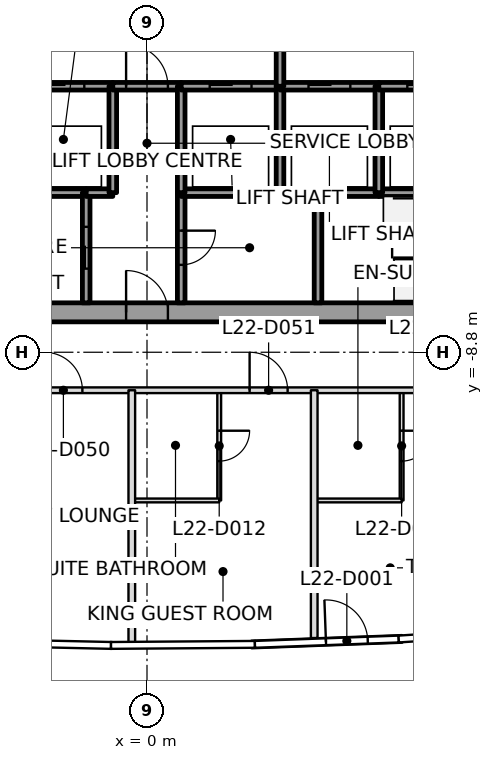
"""IFC4 building model, lengths in metres.
Left out: names, types, materials, properties, quantities, classifications, styles, units other than length and angle.
Written with IfcOpenShell. Run it as: python <this file> out.ifc"""

import sys

from ifc_helpers import new_model, si_unit, direction, frame, frame_2d, origin, place, context, subcontext, project, spatial, rectangle, extrude, element, fill, save


model = new_model("IFC4")
c1 = context("Model", 3, precision=1e-05, world=origin(), true_north=direction((0.0, 1.0)))
c2 = subcontext(c1, "Body", "Model", "MODEL_VIEW")
j1 = project(units=[si_unit("LENGTHUNIT", "METRE"), si_unit("PLANEANGLEUNIT", "RADIAN")], contexts=[c1])
p1 = place(None, origin())
s1 = spatial("IfcSite", under=j1, at=p1, CompositionType="ELEMENT")
p2 = place(p1, origin())
s2 = spatial("IfcBuilding", under=s1, at=p2, CompositionType="ELEMENT")
p3 = place(p2, frame((0.0, 0.0, 103.5)))
s3 = spatial("IfcBuildingStorey", under=s2, at=p3, CompositionType="ELEMENT", Elevation=103.5)
p4 = place(p3, frame((-11.0, -7.75, 0.0), z_axis=(0.0, 0.0, 1.0), x_axis=(1.0, 0.0, 0.0)))
e1 = element("IfcWall", 1, at=p4, inside=s3, PredefinedType="SHEAR", context=c2, shape_type="SweptSolid", body=[
    extrude(rectangle(XDim=22.0, YDim=0.5, at=frame_2d((11.0, 0.0))), origin(), (0.0, 0.0, 1.0), 3.7),
])
p5 = place(p4, frame((10.45, 0.0, 0.0)))
e2 = element("IfcOpeningElement", 2, at=p5, cuts=e1, PredefinedType="OPENING", context=c2, shape_type="SweptSolid", body=[
    extrude(rectangle(XDim=1.1, YDim=2.1, at=frame_2d((0.55, 1.05))), frame((0.0, 0.25, 0.0), z_axis=(0.0, -1.0, 0.0), x_axis=(1.0, 0.0, 0.0)), (0.0, 0.0, 1.0), 0.5),
])
p6 = place(p3, frame((2.75, -16.49, 0.0), z_axis=(0.0, 0.0, 1.0), x_axis=(0.999313230766, 0.037054916226, 0.0)))
e3 = element("IfcWall", 3, at=p6, inside=s3, PredefinedType="SOLIDWALL", context=c2, shape_type="SweptSolid", body=[
    extrude(rectangle(XDim=3.966, YDim=0.2, at=frame_2d((1.983, 0.0))), origin(), (0.0, 0.0, 1.0), 3.017),
])
p7 = place(p6, frame((1.96, 0.0, 0.0)))
e4 = element("IfcOpeningElement", 4, at=p7, cuts=e3, PredefinedType="OPENING", context=c2, shape_type="SweptSolid", body=[
    extrude(rectangle(XDim=1.1, YDim=2.1, at=frame_2d((0.55, 1.05))), frame((0.0, 0.1, 0.0), z_axis=(0.0, -1.0, 0.0), x_axis=(1.0, 0.0, 0.0)), (0.0, 0.0, 1.0), 0.2),
])
p8 = place(p3, frame((-3.5, -4.6, 0.0), z_axis=(0.0, 0.0, 1.0), x_axis=(1.0, 0.0, 0.0)))
e5 = element("IfcWall", 5, at=p8, inside=s3, PredefinedType="SOLIDWALL", context=c2, shape_type="SweptSolid", body=[
    extrude(rectangle(XDim=1.9, YDim=0.2, at=frame_2d((0.95, 0.0))), origin(), (0.0, 0.0, 1.0), 3.55),
])
p9 = place(p3, frame((-3.5, -1.8, 0.0), z_axis=(0.0, 0.0, 1.0), x_axis=(1.0, 0.0, 0.0)))
e6 = element("IfcWall", 6, at=p9, inside=s3, PredefinedType="SOLIDWALL", context=c2, shape_type="SweptSolid", body=[
    extrude(rectangle(XDim=2.6, YDim=0.2, at=frame_2d((1.3, 0.0))), origin(), (0.0, 0.0, 1.0), 3.55),
])
p10 = place(p9, frame((0.75, 0.0, 0.0)))
e7 = element("IfcOpeningElement", 7, at=p10, cuts=e6, PredefinedType="OPENING", context=c2, shape_type="SweptSolid", body=[
    extrude(rectangle(XDim=1.1, YDim=2.1, at=frame_2d((0.55, 1.05))), frame((0.0, 0.1, 0.0), z_axis=(0.0, -1.0, 0.0), x_axis=(1.0, 0.0, 0.0)), (0.0, 0.0, 1.0), 0.2),
])
p11 = place(p3, frame((-1.6, -7.5, 0.0), z_axis=(0.0, 0.0, 1.0), x_axis=(0.0, 1.0, 0.0)))
e8 = element("IfcWall", 8, at=p11, inside=s3, PredefinedType="SOLIDWALL", context=c2, shape_type="SweptSolid", body=[
    extrude(rectangle(XDim=2.9, YDim=0.2, at=frame_2d((1.45, 0.0))), origin(), (0.0, 0.0, 1.0), 3.55),
])
p12 = place(p11, frame((0.9, 0.0, 0.0)))
e9 = element("IfcOpeningElement", 9, at=p12, cuts=e8, PredefinedType="OPENING", context=c2, shape_type="SweptSolid", body=[
    extrude(rectangle(XDim=1.1, YDim=2.1, at=frame_2d((0.55, 1.05))), frame((0.0, 0.1, 0.0), z_axis=(0.0, -1.0, 0.0), x_axis=(1.0, 0.0, 0.0)), (0.0, 0.0, 1.0), 0.2),
])
p13 = place(p3, frame((-1.6, -4.6, 0.0), z_axis=(0.0, 0.0, 1.0), x_axis=(1.0, 0.0, 0.0)))
e10 = element("IfcWall", 10, at=p13, inside=s3, PredefinedType="SOLIDWALL", context=c2, shape_type="SweptSolid", body=[
    extrude(rectangle(XDim=0.7, YDim=0.2, at=frame_2d((0.35, 0.0))), origin(), (0.0, 0.0, 1.0), 3.55),
])
p14 = place(p3, frame((-0.9, -4.6, 0.0), z_axis=(0.0, 0.0, 1.0), x_axis=(0.0, 1.0, 0.0)))
e11 = element("IfcWall", 11, at=p14, inside=s3, PredefinedType="SOLIDWALL", context=c2, shape_type="SweptSolid", body=[
    extrude(rectangle(XDim=2.8, YDim=0.2, at=frame_2d((1.4, 0.0))), origin(), (0.0, 0.0, 1.0), 3.55),
])
p15 = place(p3, frame((-0.9, -1.8, 0.0), z_axis=(0.0, 0.0, 1.0), x_axis=(1.0, 0.0, 0.0)))
e12 = element("IfcWall", 12, at=p15, inside=s3, PredefinedType="SOLIDWALL", context=c2, shape_type="SweptSolid", body=[
    extrude(rectangle(XDim=1.8, YDim=0.2, at=frame_2d((0.9, 0.0))), origin(), (0.0, 0.0, 1.0), 3.55),
])
p16 = place(p15, frame((0.35, 0.0, 0.0)))
e13 = element("IfcOpeningElement", 13, at=p16, cuts=e12, PredefinedType="OPENING", context=c2, shape_type="SweptSolid", body=[
    extrude(rectangle(XDim=1.1, YDim=2.1, at=frame_2d((0.55, 1.05))), frame((0.0, 0.1, 0.0), z_axis=(0.0, -1.0, 0.0), x_axis=(1.0, 0.0, 0.0)), (0.0, 0.0, 1.0), 0.2),
])
p17 = place(p3, frame((0.9, -4.6, 0.0), z_axis=(0.0, 0.0, 1.0), x_axis=(0.0, -1.0, 0.0)))
e14 = element("IfcWall", 14, at=p17, inside=s3, PredefinedType="SOLIDWALL", context=c2, shape_type="SweptSolid", body=[
    extrude(rectangle(XDim=2.9, YDim=0.2, at=frame_2d((1.45, 0.0))), origin(), (0.0, 0.0, 1.0), 3.55),
])
p18 = place(p17, frame((1.0, 0.0, 0.0)))
e15 = element("IfcOpeningElement", 15, at=p18, cuts=e14, PredefinedType="OPENING", context=c2, shape_type="SweptSolid", body=[
    extrude(rectangle(XDim=0.9, YDim=2.1, at=frame_2d((0.45, 1.05))), frame((0.0, 0.1, 0.0), z_axis=(0.0, -1.0, 0.0), x_axis=(1.0, 0.0, 0.0)), (0.0, 0.0, 1.0), 0.2),
])
p19 = place(p3, frame((3.5, -4.6, 0.0), z_axis=(0.0, 0.0, 1.0), x_axis=(-1.0, 0.0, 0.0)))
e16 = element("IfcWall", 16, at=p19, inside=s3, PredefinedType="SOLIDWALL", context=c2, shape_type="SweptSolid", body=[
    extrude(rectangle(XDim=2.6, YDim=0.2, at=frame_2d((1.3, 0.0))), origin(), (0.0, 0.0, 1.0), 3.55),
])
p20 = place(p3, frame((0.9, -1.8, 0.0), z_axis=(0.0, 0.0, 1.0), x_axis=(0.0, -1.0, 0.0)))
e17 = element("IfcWall", 17, at=p20, inside=s3, PredefinedType="SOLIDWALL", context=c2, shape_type="SweptSolid", body=[
    extrude(rectangle(XDim=2.8, YDim=0.2, at=frame_2d((1.4, 0.0))), origin(), (0.0, 0.0, 1.0), 3.55),
])
p21 = place(p3, frame((0.9, -1.8, 0.0), z_axis=(0.0, 0.0, 1.0), x_axis=(1.0, 0.0, 0.0)))
e18 = element("IfcWall", 18, at=p21, inside=s3, PredefinedType="SOLIDWALL", context=c2, shape_type="SweptSolid", body=[
    extrude(rectangle(XDim=2.6, YDim=0.2, at=frame_2d((1.3, 0.0))), origin(), (0.0, 0.0, 1.0), 3.55),
])
p22 = place(p21, frame((0.75, 0.0, 0.0)))
e19 = element("IfcOpeningElement", 19, at=p22, cuts=e18, PredefinedType="OPENING", context=c2, shape_type="SweptSolid", body=[
    extrude(rectangle(XDim=1.1, YDim=2.1, at=frame_2d((0.55, 1.05))), frame((0.0, 0.1, 0.0), z_axis=(0.0, -1.0, 0.0), x_axis=(1.0, 0.0, 0.0)), (0.0, 0.0, 1.0), 0.2),
])
p23 = place(p3, frame((4.5, -4.6, 0.0), z_axis=(0.0, 0.0, 1.0), x_axis=(-1.0, 0.0, 0.0)))
e20 = element("IfcWall", 20, at=p23, inside=s3, PredefinedType="SOLIDWALL", context=c2, shape_type="SweptSolid", body=[
    extrude(rectangle(XDim=1.0, YDim=0.2, at=frame_2d((0.5, 0.0))), origin(), (0.0, 0.0, 1.0), 3.55),
])
p24 = place(p3, frame((3.5, -4.6, 0.0), z_axis=(0.0, 0.0, 1.0), x_axis=(0.0, 1.0, 0.0)))
e21 = element("IfcWall", 21, at=p24, inside=s3, PredefinedType="SOLIDWALL", context=c2, shape_type="SweptSolid", body=[
    extrude(rectangle(XDim=2.8, YDim=0.2, at=frame_2d((1.4, 0.0))), origin(), (0.0, 0.0, 1.0), 3.55),
])
p25 = place(p3, frame((3.5, -1.8, 0.0), z_axis=(0.0, 0.0, 1.0), x_axis=(1.0, 0.0, 0.0)))
e22 = element("IfcWall", 22, at=p25, inside=s3, PredefinedType="SOLIDWALL", context=c2, shape_type="SweptSolid", body=[
    extrude(rectangle(XDim=2.6, YDim=0.2, at=frame_2d((1.3, 0.0))), origin(), (0.0, 0.0, 1.0), 3.55),
])
p26 = place(p25, frame((0.75, 0.0, 0.0)))
e23 = element("IfcOpeningElement", 23, at=p26, cuts=e22, PredefinedType="OPENING", context=c2, shape_type="SweptSolid", body=[
    extrude(rectangle(XDim=1.1, YDim=2.1, at=frame_2d((0.55, 1.05))), frame((0.0, 0.1, 0.0), z_axis=(0.0, -1.0, 0.0), x_axis=(1.0, 0.0, 0.0)), (0.0, 0.0, 1.0), 0.2),
])
p27 = place(p3, frame((3.5, -1.8, 0.0), z_axis=(0.0, 0.0, 1.0), x_axis=(0.0, 1.0, 0.0)))
e24 = element("IfcWall", 24, at=p27, inside=s3, PredefinedType="SOLIDWALL", context=c2, shape_type="SweptSolid", body=[
    extrude(rectangle(XDim=3.6, YDim=0.2, at=frame_2d((1.8, 0.0))), origin(), (0.0, 0.0, 1.0), 3.55),
])
p28 = place(p27, frame((1.05, 0.0, 0.0)))
e25 = element("IfcOpeningElement", 25, at=p28, cuts=e24, PredefinedType="OPENING", context=c2, shape_type="SweptSolid", body=[
    extrude(rectangle(XDim=1.5, YDim=2.1, at=frame_2d((0.75, 1.05))), frame((0.0, 0.1, 0.0), z_axis=(0.0, -1.0, 0.0), x_axis=(1.0, 0.0, 0.0)), (0.0, 0.0, 1.0), 0.2),
])
p29 = place(p3, frame((4.5, -7.5, 0.0), z_axis=(0.0, 0.0, 1.0), x_axis=(0.0, 1.0, 0.0)))
e26 = element("IfcWall", 26, at=p29, inside=s3, PredefinedType="SOLIDWALL", context=c2, shape_type="SweptSolid", body=[
    extrude(rectangle(XDim=2.9, YDim=0.2, at=frame_2d((1.45, 0.0))), origin(), (0.0, 0.0, 1.0), 3.55),
])
p30 = place(p3, frame((4.5, -4.6, 0.0), z_axis=(0.0, 0.0, 1.0), x_axis=(1.0, 0.0, 0.0)))
e27 = element("IfcWall", 27, at=p30, inside=s3, PredefinedType="SOLIDWALL", context=c2, shape_type="SweptSolid", body=[
    extrude(rectangle(XDim=1.6, YDim=0.2, at=frame_2d((0.8, 0.0))), origin(), (0.0, 0.0, 1.0), 3.55),
])
p31 = place(p3, frame((6.1, -4.6, 0.0), z_axis=(0.0, 0.0, 1.0), x_axis=(1.0, 0.0, 0.0)))
e28 = element("IfcWall", 28, at=p31, inside=s3, PredefinedType="SOLIDWALL", context=c2, shape_type="SweptSolid", body=[
    extrude(rectangle(XDim=2.6, YDim=0.2, at=frame_2d((1.3, 0.0))), origin(), (0.0, 0.0, 1.0), 3.55),
])
p32 = place(p3, frame((6.1, -4.6, 0.0), z_axis=(0.0, 0.0, 1.0), x_axis=(0.0, 1.0, 0.0)))
e29 = element("IfcWall", 29, at=p32, inside=s3, PredefinedType="SOLIDWALL", context=c2, shape_type="SweptSolid", body=[
    extrude(rectangle(XDim=2.8, YDim=0.2, at=frame_2d((1.4, 0.0))), origin(), (0.0, 0.0, 1.0), 3.55),
])
p33 = place(p3, frame((6.1, -1.8, 0.0), z_axis=(0.0, 0.0, 1.0), x_axis=(1.0, 0.0, 0.0)))
e30 = element("IfcWall", 30, at=p33, inside=s3, PredefinedType="SOLIDWALL", context=c2, shape_type="SweptSolid", body=[
    extrude(rectangle(XDim=2.6, YDim=0.2, at=frame_2d((1.3, 0.0))), origin(), (0.0, 0.0, 1.0), 3.55),
])
p34 = place(p33, frame((0.75, 0.0, 0.0)))
e31 = element("IfcOpeningElement", 31, at=p34, cuts=e30, PredefinedType="OPENING", context=c2, shape_type="SweptSolid", body=[
    extrude(rectangle(XDim=1.1, YDim=2.1, at=frame_2d((0.55, 1.05))), frame((0.0, 0.1, 0.0), z_axis=(0.0, -1.0, 0.0), x_axis=(1.0, 0.0, 0.0)), (0.0, 0.0, 1.0), 0.2),
])
p35 = place(p3, frame((-0.4, -16.515, 0.0), z_axis=(0.0, 0.0, 1.0), x_axis=(0.0, 1.0, 0.0)))
e32 = element("IfcWall", 32, at=p35, inside=s3, PredefinedType="PARTITIONING", context=c2, shape_type="SweptSolid", body=[
    extrude(rectangle(XDim=6.715, YDim=0.175, at=frame_2d((3.357, 0.0))), origin(), (0.0, 0.0, 1.0), 3.15),
])
p36 = place(p3, frame((4.4, -9.8, 0.0), z_axis=(0.0, 0.0, 1.0), x_axis=(0.0, -1.0, 0.0)))
e33 = element("IfcWall", 33, at=p36, inside=s3, PredefinedType="PARTITIONING", context=c2, shape_type="SweptSolid", body=[
    extrude(rectangle(XDim=6.521, YDim=0.175, at=frame_2d((3.26, 0.0))), origin(), (0.0, 0.0, 1.0), 3.15),
])
p37 = place(p3, frame((-12.72, -9.8, 0.0), z_axis=(0.0, 0.0, 1.0), x_axis=(1.0, 0.0, 0.0)))
e34 = element("IfcWall", 34, at=p37, inside=s3, PredefinedType="PARTITIONING", context=c2, shape_type="SweptSolid", body=[
    extrude(rectangle(XDim=25.44, YDim=0.15, at=frame_2d((12.72, 0.0))), origin(), (0.0, 0.0, 1.0), 3.017),
])
p38 = place(p37, frame((1.62, 0.0, 0.0)))
e35 = element("IfcOpeningElement", 35, at=p38, cuts=e34, PredefinedType="OPENING", context=c2, shape_type="SweptSolid", body=[
    extrude(rectangle(XDim=1.0, YDim=2.1, at=frame_2d((0.5, 1.05))), frame((0.0, 0.075, 0.0), z_axis=(0.0, -1.0, 0.0), x_axis=(1.0, 0.0, 0.0)), (0.0, 0.0, 1.0), 0.15),
])
p39 = place(p37, frame((7.22, 0.0, 0.0)))
e36 = element("IfcOpeningElement", 36, at=p39, cuts=e34, PredefinedType="OPENING", context=c2, shape_type="SweptSolid", body=[
    extrude(rectangle(XDim=1.0, YDim=2.1, at=frame_2d((0.5, 1.05))), frame((0.0, 0.075, 0.0), z_axis=(0.0, -1.0, 0.0), x_axis=(1.0, 0.0, 0.0)), (0.0, 0.0, 1.0), 0.15),
])
p40 = place(p37, frame((10.02, 0.0, 0.0)))
e37 = element("IfcOpeningElement", 37, at=p40, cuts=e34, PredefinedType="OPENING", context=c2, shape_type="SweptSolid", body=[
    extrude(rectangle(XDim=1.0, YDim=2.1, at=frame_2d((0.5, 1.05))), frame((0.0, 0.075, 0.0), z_axis=(0.0, -1.0, 0.0), x_axis=(1.0, 0.0, 0.0)), (0.0, 0.0, 1.0), 0.15),
])
p41 = place(p37, frame((15.42, 0.0, 0.0)))
e38 = element("IfcOpeningElement", 38, at=p41, cuts=e34, PredefinedType="OPENING", context=c2, shape_type="SweptSolid", body=[
    extrude(rectangle(XDim=1.0, YDim=2.1, at=frame_2d((0.5, 1.05))), frame((0.0, 0.075, 0.0), z_axis=(0.0, -1.0, 0.0), x_axis=(1.0, 0.0, 0.0)), (0.0, 0.0, 1.0), 0.15),
])
p42 = place(p37, frame((19.82, 0.0, 0.0)))
e39 = element("IfcOpeningElement", 39, at=p42, cuts=e34, PredefinedType="OPENING", context=c2, shape_type="SweptSolid", body=[
    extrude(rectangle(XDim=1.0, YDim=2.1, at=frame_2d((0.5, 1.05))), frame((0.0, 0.075, 0.0), z_axis=(0.0, -1.0, 0.0), x_axis=(1.0, 0.0, 0.0)), (0.0, 0.0, 1.0), 0.15),
])
p43 = place(p3, frame((1.9, -9.83, 0.0), z_axis=(0.0, 0.0, 1.0), x_axis=(0.0, -1.0, 0.0)))
e40 = element("IfcWall", 40, at=p43, inside=s3, PredefinedType="PARTITIONING", context=c2, shape_type="SweptSolid", body=[
    extrude(rectangle(XDim=2.87, YDim=0.1, at=frame_2d((1.435, 0.0))), origin(), (0.0, 0.0, 1.0), 3.15),
])
p44 = place(p43, frame((1.035, 0.0, 0.0)))
e41 = element("IfcOpeningElement", 41, at=p44, cuts=e40, PredefinedType="OPENING", context=c2, shape_type="SweptSolid", body=[
    extrude(rectangle(XDim=0.8, YDim=2.1, at=frame_2d((0.4, 1.05))), frame((0.0, 0.05, 0.0), z_axis=(0.0, -1.0, 0.0), x_axis=(1.0, 0.0, 0.0)), (0.0, 0.0, 1.0), 0.1),
])
p45 = place(p3, frame((1.9, -12.7, 0.0), z_axis=(0.0, 0.0, 1.0), x_axis=(-1.0, 0.0, 0.0)))
e42 = element("IfcWall", 42, at=p45, inside=s3, PredefinedType="PARTITIONING", context=c2, shape_type="SweptSolid", body=[
    extrude(rectangle(XDim=2.27, YDim=0.1, at=frame_2d((1.135, 0.0))), origin(), (0.0, 0.0, 1.0), 3.017),
])
p46 = place(p3, frame((6.7, -9.83, 0.0), z_axis=(0.0, 0.0, 1.0), x_axis=(0.0, -1.0, 0.0)))
e43 = element("IfcWall", 43, at=p46, inside=s3, PredefinedType="PARTITIONING", context=c2, shape_type="SweptSolid", body=[
    extrude(rectangle(XDim=2.87, YDim=0.1, at=frame_2d((1.435, 0.0))), origin(), (0.0, 0.0, 1.0), 3.15),
])
p47 = place(p46, frame((1.035, 0.0, 0.0)))
e44 = element("IfcOpeningElement", 44, at=p47, cuts=e43, PredefinedType="OPENING", context=c2, shape_type="SweptSolid", body=[
    extrude(rectangle(XDim=0.8, YDim=2.1, at=frame_2d((0.4, 1.05))), frame((0.0, 0.05, 0.0), z_axis=(0.0, -1.0, 0.0), x_axis=(1.0, 0.0, 0.0)), (0.0, 0.0, 1.0), 0.1),
])
p48 = place(p3, frame((6.7, -12.7, 0.0), z_axis=(0.0, 0.0, 1.0), x_axis=(-1.0, 0.0, 0.0)))
e45 = element("IfcWall", 45, at=p48, inside=s3, PredefinedType="PARTITIONING", context=c2, shape_type="SweptSolid", body=[
    extrude(rectangle(XDim=2.27, YDim=0.1, at=frame_2d((1.135, 0.0))), origin(), (0.0, 0.0, 1.0), 3.017),
])
p49 = place(p7, origin())
e46 = element("IfcDoor", 46, at=p49, inside=s3, OperationType="SINGLE_SWING_RIGHT", PredefinedType="DOOR", context=c2, shape_type="SweptSolid", body=[
    extrude(rectangle(XDim=1.1, YDim=2.1, at=frame_2d((0.55, 1.05))), frame((0.0, 0.025, 0.0), z_axis=(0.0, -1.0, 0.0), x_axis=(1.0, 0.0, 0.0)), (0.0, 0.0, 1.0), 0.05),
])
fill(e4, e46)
p50 = place(p40, origin())
e47 = element("IfcDoor", 47, at=p50, inside=s3, OperationType="SINGLE_SWING_LEFT", PredefinedType="DOOR", context=c2, shape_type="SweptSolid", body=[
    extrude(rectangle(XDim=1.0, YDim=2.1, at=frame_2d((0.5, 1.05))), frame((0.0, 0.025, 0.0), z_axis=(0.0, -1.0, 0.0), x_axis=(1.0, 0.0, 0.0)), (0.0, 0.0, 1.0), 0.05),
])
fill(e37, e47)
p51 = place(p41, origin())
e48 = element("IfcDoor", 48, at=p51, inside=s3, OperationType="SINGLE_SWING_LEFT", PredefinedType="DOOR", context=c2, shape_type="SweptSolid", body=[
    extrude(rectangle(XDim=1.0, YDim=2.1, at=frame_2d((0.5, 1.05))), frame((0.0, 0.025, 0.0), z_axis=(0.0, -1.0, 0.0), x_axis=(1.0, 0.0, 0.0)), (0.0, 0.0, 1.0), 0.05),
])
fill(e38, e48)
p52 = place(p44, origin())
e49 = element("IfcDoor", 49, at=p52, inside=s3, OperationType="SINGLE_SWING_LEFT", PredefinedType="DOOR", context=c2, shape_type="SweptSolid", body=[
    extrude(rectangle(XDim=0.8, YDim=2.1, at=frame_2d((0.4, 1.05))), frame((0.0, 0.025, 0.0), z_axis=(0.0, -1.0, 0.0), x_axis=(1.0, 0.0, 0.0)), (0.0, 0.0, 1.0), 0.05),
])
fill(e41, e49)
p53 = place(p47, origin())
e50 = element("IfcDoor", 50, at=p53, inside=s3, OperationType="SINGLE_SWING_RIGHT", PredefinedType="DOOR", context=c2, shape_type="SweptSolid", body=[
    extrude(rectangle(XDim=0.8, YDim=2.1, at=frame_2d((0.4, 1.05))), frame((0.0, 0.025, 0.0), z_axis=(0.0, -1.0, 0.0), x_axis=(1.0, 0.0, 0.0)), (0.0, 0.0, 1.0), 0.05),
])
fill(e44, e50)
p54 = place(p10, origin())
e51 = element("IfcDoor", 51, at=p54, inside=s3, OperationType="SLIDING_TO_RIGHT", PredefinedType="DOOR", context=c2, shape_type="SweptSolid", body=[
    extrude(rectangle(XDim=1.1, YDim=2.1, at=frame_2d((0.55, 1.05))), frame((0.0, 0.025, 0.0), z_axis=(0.0, -1.0, 0.0), x_axis=(1.0, 0.0, 0.0)), (0.0, 0.0, 1.0), 0.05),
])
fill(e7, e51)
p55 = place(p22, origin())
e52 = element("IfcDoor", 52, at=p55, inside=s3, OperationType="SLIDING_TO_RIGHT", PredefinedType="DOOR", context=c2, shape_type="SweptSolid", body=[
    extrude(rectangle(XDim=1.1, YDim=2.1, at=frame_2d((0.55, 1.05))), frame((0.0, 0.025, 0.0), z_axis=(0.0, -1.0, 0.0), x_axis=(1.0, 0.0, 0.0)), (0.0, 0.0, 1.0), 0.05),
])
fill(e19, e52)
p56 = place(p26, origin())
e53 = element("IfcDoor", 53, at=p56, inside=s3, OperationType="SLIDING_TO_LEFT", PredefinedType="DOOR", context=c2, shape_type="SweptSolid", body=[
    extrude(rectangle(XDim=1.1, YDim=2.1, at=frame_2d((0.55, 1.05))), frame((0.0, 0.025, 0.0), z_axis=(0.0, -1.0, 0.0), x_axis=(1.0, 0.0, 0.0)), (0.0, 0.0, 1.0), 0.05),
])
fill(e23, e53)
p57 = place(p34, origin())
e54 = element("IfcDoor", 54, at=p57, inside=s3, OperationType="SLIDING_TO_RIGHT", PredefinedType="DOOR", context=c2, shape_type="SweptSolid", body=[
    extrude(rectangle(XDim=1.1, YDim=2.1, at=frame_2d((0.55, 1.05))), frame((0.0, 0.025, 0.0), z_axis=(0.0, -1.0, 0.0), x_axis=(1.0, 0.0, 0.0)), (0.0, 0.0, 1.0), 0.05),
])
fill(e31, e54)
p58 = place(p12, origin())
e55 = element("IfcDoor", 55, at=p58, inside=s3, OperationType="SLIDING_TO_RIGHT", PredefinedType="DOOR", context=c2, shape_type="SweptSolid", body=[
    extrude(rectangle(XDim=1.1, YDim=2.1, at=frame_2d((0.55, 1.05))), frame((0.0, 0.025, 0.0), z_axis=(0.0, -1.0, 0.0), x_axis=(1.0, 0.0, 0.0)), (0.0, 0.0, 1.0), 0.05),
])
fill(e9, e55)
p59 = place(p16, origin())
e56 = element("IfcDoor", 56, at=p59, inside=s3, OperationType="SINGLE_SWING_RIGHT", PredefinedType="DOOR", context=c2, shape_type="SweptSolid", body=[
    extrude(rectangle(XDim=1.1, YDim=2.1, at=frame_2d((0.55, 1.05))), frame((0.0, 0.025, 0.0), z_axis=(0.0, -1.0, 0.0), x_axis=(1.0, 0.0, 0.0)), (0.0, 0.0, 1.0), 0.05),
])
fill(e13, e56)
p60 = place(p18, origin())
e57 = element("IfcDoor", 57, at=p60, inside=s3, OperationType="SINGLE_SWING_RIGHT", PredefinedType="DOOR", context=c2, shape_type="SweptSolid", body=[
    extrude(rectangle(XDim=0.9, YDim=2.1, at=frame_2d((0.45, 1.05))), frame((0.0, 0.025, 0.0), z_axis=(0.0, -1.0, 0.0), x_axis=(1.0, 0.0, 0.0)), (0.0, 0.0, 1.0), 0.05),
])
fill(e15, e57)
p61 = place(p5, origin())
e58 = element("IfcDoor", 58, at=p61, inside=s3, OperationType="SINGLE_SWING_LEFT", PredefinedType="DOOR", context=c2, shape_type="SweptSolid", body=[
    extrude(rectangle(XDim=1.1, YDim=2.1, at=frame_2d((0.55, 1.05))), frame((0.0, 0.025, 0.0), z_axis=(0.0, -1.0, 0.0), x_axis=(1.0, 0.0, 0.0)), (0.0, 0.0, 1.0), 0.05),
])
fill(e2, e58)
save(model, sys.argv[1])
